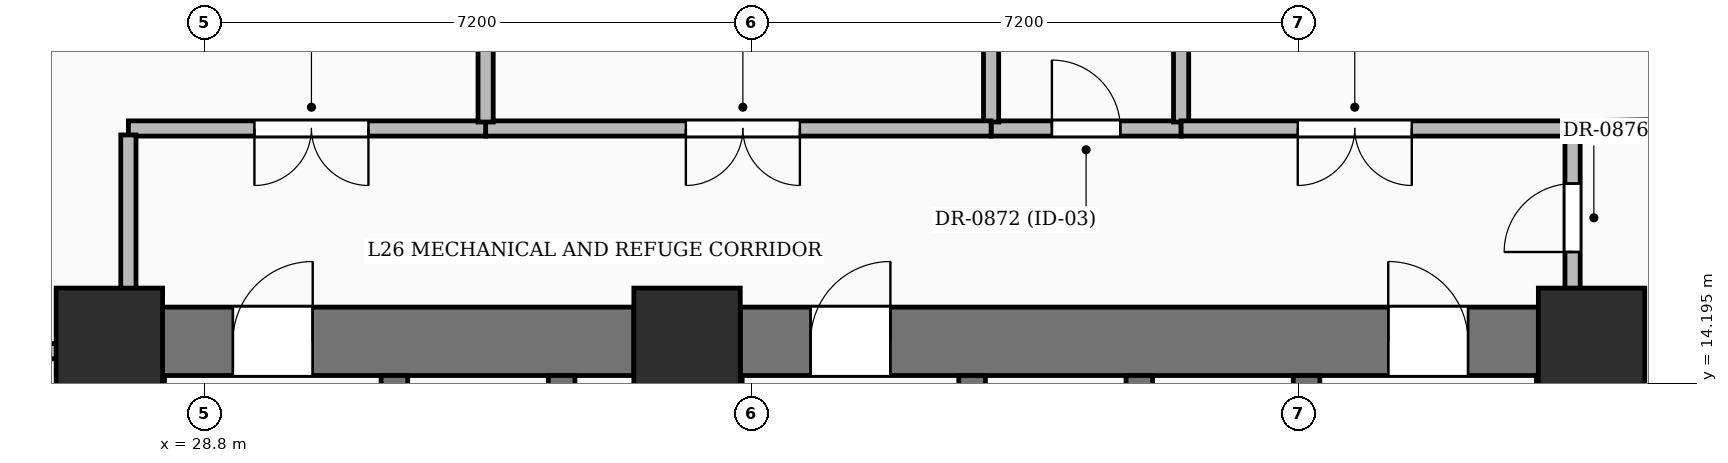
"""IFC4 building model, lengths in metres.
Left out: names, types, materials, properties, quantities, classifications, styles, units other than length and angle.
Written with IfcOpenShell. Run it as: python <this file> out.ifc"""

import sys

from ifc_helpers import new_model, si_unit, direction, frame, frame_2d, origin, origin_2d, place, context, subcontext, project, spatial, rectangle, extrude, element, fill, save


model = new_model("IFC4")
c1 = context("Model", 3, precision=1e-05, world=origin(), true_north=direction((0.0, 1.0)))
c2 = subcontext(c1, "Body", "Model", "MODEL_VIEW")
j1 = project(units=[si_unit("LENGTHUNIT", "METRE"), si_unit("PLANEANGLEUNIT", "RADIAN")], contexts=[c1])
p1 = place(None, origin())
s1 = spatial("IfcSite", under=j1, at=p1, CompositionType="ELEMENT")
p2 = place(p1, origin())
s2 = spatial("IfcBuilding", under=s1, at=p2, CompositionType="ELEMENT")
p3 = place(p2, frame((0.0, 0.0, 105.0)))
s3 = spatial("IfcBuildingStorey", under=s2, at=p3, CompositionType="ELEMENT", Elevation=105.0)
for number, where, z_axis, x_axis in (
    (1, (27.55, 14.75, 0.0), (0.0, 0.0, 1.0), (1.0, 0.0, 0.0)),
    (2, (35.15, 14.75, 0.0), (0.0, 0.0, 1.0), (1.0, 0.0, 0.0)),
    (3, (47.05, 14.75, 0.0), (0.0, 0.0, 1.0), (1.0, 0.0, 0.0)),
):
    element("IfcColumn", number, at=place(p3, frame(where, z_axis=z_axis, x_axis=x_axis)), inside=s3, PredefinedType="COLUMN", context=c2, shape_type="SweptSolid", body=[
        extrude(rectangle(XDim=1.4, YDim=1.4, at=origin_2d()), origin(), (0.0, 0.0, 1.0), 5.4),
    ])
p4 = place(p3, frame((28.25, 14.75, 0.0), z_axis=(0.0, 0.0, 1.0), x_axis=(1.0, 0.0, 0.0)))
e4 = element("IfcWall", 4, at=p4, inside=s3, PredefinedType="SHEAR", context=c2, shape_type="SweptSolid", body=[
    extrude(rectangle(XDim=6.2, YDim=0.9, at=frame_2d((3.1, 0.0))), origin(), (0.0, 0.0, 1.0), 5.4),
])
p5 = place(p4, frame((0.925, 0.0, 0.0)))
e5 = element("IfcOpeningElement", 5, at=p5, cuts=e4, PredefinedType="OPENING", context=c2, shape_type="SweptSolid", body=[
    extrude(rectangle(XDim=1.05, YDim=2.15, at=frame_2d((0.525, 1.075))), frame((0.0, 0.46, 0.0), z_axis=(0.0, -1.0, 0.0), x_axis=(1.0, 0.0, 0.0)), (0.0, 0.0, 1.0), 0.92),
])
p6 = place(p3, frame((35.85, 14.75, 0.0), z_axis=(0.0, 0.0, 1.0), x_axis=(1.0, 0.0, 0.0)))
e6 = element("IfcWall", 6, at=p6, inside=s3, PredefinedType="SHEAR", context=c2, shape_type="SweptSolid", body=[
    extrude(rectangle(XDim=10.5, YDim=0.9, at=frame_2d((5.25, 0.0))), origin(), (0.0, 0.0, 1.0), 5.4),
])
p7 = place(p6, frame((0.925, 0.0, 0.0)))
e7 = element("IfcOpeningElement", 7, at=p7, cuts=e6, PredefinedType="OPENING", context=c2, shape_type="SweptSolid", body=[
    extrude(rectangle(XDim=1.05, YDim=2.15, at=frame_2d((0.525, 1.075))), frame((0.0, 0.46, 0.0), z_axis=(0.0, -1.0, 0.0), x_axis=(1.0, 0.0, 0.0)), (0.0, 0.0, 1.0), 0.92),
])
p8 = place(p6, frame((8.525, 0.0, 0.0)))
e8 = element("IfcOpeningElement", 8, at=p8, cuts=e6, PredefinedType="OPENING", context=c2, shape_type="SweptSolid", body=[
    extrude(rectangle(XDim=1.05, YDim=2.15, at=frame_2d((0.525, 1.075))), frame((0.0, 0.46, 0.0), z_axis=(0.0, -1.0, 0.0), x_axis=(1.0, 0.0, 0.0)), (0.0, 0.0, 1.0), 0.92),
])
p9 = place(p3, frame((28.1, 5.2, 0.0), z_axis=(0.0, 0.0, 1.0), x_axis=(0.0, 1.0, 0.0)))
e9 = element("IfcWall", 9, at=p9, inside=s3, PredefinedType="SOLIDWALL", context=c2, shape_type="SweptSolid", body=[
    extrude(rectangle(XDim=9.1, YDim=0.35, at=frame_2d((4.55, 0.0))), origin(), (0.0, 0.0, 1.0), 5.4),
])
p10 = place(p3, frame((31.3, 5.2, 0.0), z_axis=(0.0, 0.0, 1.0), x_axis=(0.0, 1.0, 0.0)))
e10 = element("IfcWall", 10, at=p10, inside=s3, PredefinedType="SOLIDWALL", context=c2, shape_type="SweptSolid", body=[
    extrude(rectangle(XDim=9.1, YDim=0.35, at=frame_2d((4.55, 0.0))), origin(), (0.0, 0.0, 1.0), 5.4),
])
p11 = place(p10, frame((6.02, 0.0, 0.0)))
e11 = element("IfcOpeningElement", 11, at=p11, cuts=e10, PredefinedType="OPENING", context=c2, shape_type="SweptSolid", body=[
    extrude(rectangle(XDim=1.0, YDim=2.15, at=frame_2d((0.5, 1.075))), frame((0.0, 0.185, 0.0), z_axis=(0.0, -1.0, 0.0), x_axis=(1.0, 0.0, 0.0)), (0.0, 0.0, 1.0), 0.37),
])
p12 = place(p3, frame((35.7, 5.2, 0.0), z_axis=(0.0, 0.0, 1.0), x_axis=(0.0, 1.0, 0.0)))
e12 = element("IfcWall", 12, at=p12, inside=s3, PredefinedType="SOLIDWALL", context=c2, shape_type="SweptSolid", body=[
    extrude(rectangle(XDim=9.1, YDim=0.35, at=frame_2d((4.55, 0.0))), origin(), (0.0, 0.0, 1.0), 5.4),
])
p13 = place(p12, frame((6.02, 0.0, 0.0)))
e13 = element("IfcOpeningElement", 13, at=p13, cuts=e12, PredefinedType="OPENING", context=c2, shape_type="SweptSolid", body=[
    extrude(rectangle(XDim=1.0, YDim=2.15, at=frame_2d((0.5, 1.075))), frame((0.0, 0.185, 0.0), z_axis=(0.0, -1.0, 0.0), x_axis=(1.0, 0.0, 0.0)), (0.0, 0.0, 1.0), 0.37),
])
p14 = place(p3, frame((38.9, 5.2, 0.0), z_axis=(0.0, 0.0, 1.0), x_axis=(0.0, 1.0, 0.0)))
e14 = element("IfcWall", 14, at=p14, inside=s3, PredefinedType="SOLIDWALL", context=c2, shape_type="SweptSolid", body=[
    extrude(rectangle(XDim=9.1, YDim=0.35, at=frame_2d((4.55, 0.0))), origin(), (0.0, 0.0, 1.0), 5.4),
])
p15 = place(p14, frame((6.02, 0.0, 0.0)))
e15 = element("IfcOpeningElement", 15, at=p15, cuts=e14, PredefinedType="OPENING", context=c2, shape_type="SweptSolid", body=[
    extrude(rectangle(XDim=1.0, YDim=2.15, at=frame_2d((0.5, 1.075))), frame((0.0, 0.185, 0.0), z_axis=(0.0, -1.0, 0.0), x_axis=(1.0, 0.0, 0.0)), (0.0, 0.0, 1.0), 0.37),
])
p16 = place(p3, frame((43.3, 5.2, 0.0), z_axis=(0.0, 0.0, 1.0), x_axis=(0.0, 1.0, 0.0)))
e16 = element("IfcWall", 16, at=p16, inside=s3, PredefinedType="SOLIDWALL", context=c2, shape_type="SweptSolid", body=[
    extrude(rectangle(XDim=9.1, YDim=0.35, at=frame_2d((4.55, 0.0))), origin(), (0.0, 0.0, 1.0), 5.4),
])
p17 = place(p16, frame((6.02, 0.0, 0.0)))
e17 = element("IfcOpeningElement", 17, at=p17, cuts=e16, PredefinedType="OPENING", context=c2, shape_type="SweptSolid", body=[
    extrude(rectangle(XDim=1.0, YDim=2.15, at=frame_2d((0.5, 1.075))), frame((0.0, 0.185, 0.0), z_axis=(0.0, -1.0, 0.0), x_axis=(1.0, 0.0, 0.0)), (0.0, 0.0, 1.0), 0.37),
])
p18 = place(p3, frame((46.5, 5.2, 0.0), z_axis=(0.0, 0.0, 1.0), x_axis=(0.0, 1.0, 0.0)))
e18 = element("IfcWall", 18, at=p18, inside=s3, PredefinedType="SOLIDWALL", context=c2, shape_type="SweptSolid", body=[
    extrude(rectangle(XDim=9.1, YDim=0.35, at=frame_2d((4.55, 0.0))), origin(), (0.0, 0.0, 1.0), 5.4),
])
for number, where, z_axis, x_axis in (
    (19, (33.5, 12.375, 0.0), (0.0, 0.0, 1.0), (0.0, 1.0, 0.0)),
    (20, (41.1, 12.375, 0.0), (0.0, 0.0, 1.0), (0.0, 1.0, 0.0)),
):
    element("IfcWall", number, at=place(p3, frame(where, z_axis=z_axis, x_axis=x_axis)), inside=s3, PredefinedType="SOLIDWALL", context=c2, shape_type="SweptSolid", body=[
        extrude(rectangle(XDim=1.925, YDim=0.35, at=frame_2d((0.962, 0.0))), origin(), (0.0, 0.0, 1.0), 5.4),
    ])
p19 = place(p3, frame((25.955, 14.62, 0.0), z_axis=(0.0, 0.0, 1.0), x_axis=(1.0, 0.0, 0.0)))
e21 = element("IfcWall", 21, at=p19, inside=s3, PredefinedType="PARTITIONING", context=c2, shape_type="SweptSolid", body=[
    extrude(rectangle(XDim=1.13, YDim=0.2, at=frame_2d((0.565, 0.0))), origin(), (0.0, 0.0, 1.0), 5.15),
])
p20 = place(p3, frame((39.15, 17.55, 0.0), z_axis=(0.0, 0.0, 1.0), x_axis=(1.0, 0.0, 0.0)))
e22 = element("IfcWall", 22, at=p20, inside=s3, PredefinedType="PARTITIONING", context=c2, shape_type="SweptSolid", body=[
    extrude(rectangle(XDim=2.5, YDim=0.2, at=frame_2d((1.25, 0.0))), origin(), (0.0, 0.0, 1.0), 5.15),
])
p21 = place(p20, frame((0.8, 0.0, 0.0)))
e23 = element("IfcOpeningElement", 23, at=p21, cuts=e22, PredefinedType="OPENING", context=c2, shape_type="SweptSolid", body=[
    extrude(rectangle(XDim=0.9, YDim=2.1, at=frame_2d((0.45, 1.05))), frame((0.0, 0.11, 0.0), z_axis=(0.0, -1.0, 0.0), x_axis=(1.0, 0.0, 0.0)), (0.0, 0.0, 1.0), 0.22),
])
p22 = place(p3, frame((39.15, 26.5, 0.0), z_axis=(0.0, 0.0, 1.0), x_axis=(0.0, -1.0, 0.0)))
e24 = element("IfcWall", 24, at=p22, inside=s3, PredefinedType="PARTITIONING", context=c2, shape_type="SweptSolid", body=[
    extrude(rectangle(XDim=8.865, YDim=0.2, at=frame_2d((4.433, 0.0))), origin(), (0.0, 0.0, 1.0), 4.17),
])
p23 = place(p3, frame((41.65, 17.635, 0.0), z_axis=(0.0, 0.0, 1.0), x_axis=(0.0, 1.0, 0.0)))
e25 = element("IfcWall", 25, at=p23, inside=s3, PredefinedType="PARTITIONING", context=c2, shape_type="SweptSolid", body=[
    extrude(rectangle(XDim=11.665, YDim=0.2, at=frame_2d((5.833, 0.0))), origin(), (0.0, 0.0, 1.0), 4.17),
])
p24 = place(p3, frame((39.15, 17.55, 0.0), z_axis=(0.0, 0.0, 1.0), x_axis=(-1.0, 0.0, 0.0)))
e26 = element("IfcWall", 26, at=p24, inside=s3, PredefinedType="PARTITIONING", context=c2, shape_type="SweptSolid", body=[
    extrude(rectangle(XDim=6.65, YDim=0.2, at=frame_2d((3.325, 0.0))), origin(), (0.0, 0.0, 1.0), 4.236),
])
p25 = place(p24, frame((2.516, 0.0, 0.0)))
e27 = element("IfcOpeningElement", 27, at=p25, cuts=e26, PredefinedType="OPENING", context=c2, shape_type="SweptSolid", body=[
    extrude(rectangle(XDim=1.5, YDim=2.2, at=frame_2d((0.75, 1.1))), frame((0.0, 0.11, 0.0), z_axis=(0.0, -1.0, 0.0), x_axis=(1.0, 0.0, 0.0)), (0.0, 0.0, 1.0), 0.22),
])
p26 = place(p3, frame((46.8, 17.55, 0.0), z_axis=(0.0, 0.0, 1.0), x_axis=(-1.0, 0.0, 0.0)))
e28 = element("IfcWall", 28, at=p26, inside=s3, PredefinedType="PARTITIONING", context=c2, shape_type="SweptSolid", body=[
    extrude(rectangle(XDim=5.15, YDim=0.2, at=frame_2d((2.575, 0.0))), origin(), (0.0, 0.0, 1.0), 4.236),
])
p27 = place(p26, frame((2.115, 0.0, 0.0)))
e29 = element("IfcOpeningElement", 29, at=p27, cuts=e28, PredefinedType="OPENING", context=c2, shape_type="SweptSolid", body=[
    extrude(rectangle(XDim=1.5, YDim=2.2, at=frame_2d((0.75, 1.1))), frame((0.0, 0.11, 0.0), z_axis=(0.0, -1.0, 0.0), x_axis=(1.0, 0.0, 0.0)), (0.0, 0.0, 1.0), 0.22),
])
p28 = place(p3, frame((46.8, 15.2, 0.0), z_axis=(0.0, 0.0, 1.0), x_axis=(0.0, 1.0, 0.0)))
e30 = element("IfcWall", 30, at=p28, inside=s3, PredefinedType="PARTITIONING", context=c2, shape_type="SweptSolid", body=[
    extrude(rectangle(XDim=2.265, YDim=0.2, at=frame_2d((1.133, 0.0))), origin(), (0.0, 0.0, 1.0), 4.236),
])
p29 = place(p28, frame((0.725, 0.0, 0.0)))
e31 = element("IfcOpeningElement", 31, at=p29, cuts=e30, PredefinedType="OPENING", context=c2, shape_type="SweptSolid", body=[
    extrude(rectangle(XDim=0.9, YDim=2.1, at=frame_2d((0.45, 1.05))), frame((0.0, 0.11, 0.0), z_axis=(0.0, -1.0, 0.0), x_axis=(1.0, 0.0, 0.0)), (0.0, 0.0, 1.0), 0.22),
])
p30 = place(p3, frame((32.5, 17.55, 0.0), z_axis=(0.0, 0.0, 1.0), x_axis=(-1.0, 0.0, 0.0)))
e32 = element("IfcWall", 32, at=p30, inside=s3, PredefinedType="PARTITIONING", context=c2, shape_type="SweptSolid", body=[
    extrude(rectangle(XDim=4.7, YDim=0.2, at=frame_2d((2.35, 0.0))), origin(), (0.0, 0.0, 1.0), 5.15),
])
p31 = place(p30, frame((1.542, 0.0, 0.0)))
e33 = element("IfcOpeningElement", 33, at=p31, cuts=e32, PredefinedType="OPENING", context=c2, shape_type="SweptSolid", body=[
    extrude(rectangle(XDim=1.5, YDim=2.2, at=frame_2d((0.75, 1.1))), frame((0.0, 0.11, 0.0), z_axis=(0.0, -1.0, 0.0), x_axis=(1.0, 0.0, 0.0)), (0.0, 0.0, 1.0), 0.22),
])
p32 = place(p3, frame((27.8, 17.465, 0.0), z_axis=(0.0, 0.0, 1.0), x_axis=(0.0, -1.0, 0.0)))
e34 = element("IfcWall", 34, at=p32, inside=s3, PredefinedType="PARTITIONING", context=c2, shape_type="SweptSolid", body=[
    extrude(rectangle(XDim=2.265, YDim=0.2, at=frame_2d((1.133, 0.0))), origin(), (0.0, 0.0, 1.0), 5.15),
])
p33 = place(p3, frame((32.5, 26.415, 0.0), z_axis=(0.0, 0.0, 1.0), x_axis=(0.0, -1.0, 0.0)))
e35 = element("IfcWall", 35, at=p33, inside=s3, PredefinedType="PARTITIONING", context=c2, shape_type="SweptSolid", body=[
    extrude(rectangle(XDim=8.78, YDim=0.2, at=frame_2d((4.39, 0.0))), origin(), (0.0, 0.0, 1.0), 4.172),
])
p34 = place(p3, frame((46.8, 17.55, 0.0), z_axis=(0.0, 0.0, 1.0), x_axis=(0.999890796761, 0.014778178263, 0.0)))
e36 = element("IfcWall", 36, at=p34, inside=s3, PredefinedType="PARTITIONING", context=c2, shape_type="SweptSolid", body=[
    extrude(rectangle(XDim=6.559, YDim=0.2, at=frame_2d((3.279, 0.0))), origin(), (0.0, 0.0, 1.0), 4.172),
])
p35 = place(p5, origin())
e37 = element("IfcDoor", 37, at=p35, inside=s3, OperationType="SINGLE_SWING_RIGHT", PredefinedType="DOOR", context=c2, shape_type="SweptSolid", body=[
    extrude(rectangle(XDim=1.05, YDim=2.15, at=frame_2d((0.525, 1.075))), frame((0.0, 0.025, 0.0), z_axis=(0.0, -1.0, 0.0), x_axis=(1.0, 0.0, 0.0)), (0.0, 0.0, 1.0), 0.05),
])
fill(e5, e37)
p36 = place(p7, origin())
e38 = element("IfcDoor", 38, at=p36, inside=s3, OperationType="SINGLE_SWING_RIGHT", PredefinedType="DOOR", context=c2, shape_type="SweptSolid", body=[
    extrude(rectangle(XDim=1.05, YDim=2.15, at=frame_2d((0.525, 1.075))), frame((0.0, 0.025, 0.0), z_axis=(0.0, -1.0, 0.0), x_axis=(1.0, 0.0, 0.0)), (0.0, 0.0, 1.0), 0.05),
])
fill(e7, e38)
p37 = place(p8, origin())
e39 = element("IfcDoor", 39, at=p37, inside=s3, OperationType="SINGLE_SWING_LEFT", PredefinedType="DOOR", context=c2, shape_type="SweptSolid", body=[
    extrude(rectangle(XDim=1.05, YDim=2.15, at=frame_2d((0.525, 1.075))), frame((0.0, 0.025, 0.0), z_axis=(0.0, -1.0, 0.0), x_axis=(1.0, 0.0, 0.0)), (0.0, 0.0, 1.0), 0.05),
])
fill(e8, e39)
p38 = place(p21, origin())
e40 = element("IfcDoor", 40, at=p38, inside=s3, OperationType="SINGLE_SWING_LEFT", PredefinedType="DOOR", context=c2, shape_type="SweptSolid", body=[
    extrude(rectangle(XDim=0.9, YDim=2.1, at=frame_2d((0.45, 1.05))), frame((0.0, 0.025, 0.0), z_axis=(0.0, -1.0, 0.0), x_axis=(1.0, 0.0, 0.0)), (0.0, 0.0, 1.0), 0.05),
])
fill(e23, e40)
p39 = place(p25, origin())
e41 = element("IfcDoor", 41, at=p39, inside=s3, OperationType="DOUBLE_DOOR_SINGLE_SWING", PredefinedType="DOOR", context=c2, shape_type="SweptSolid", body=[
    extrude(rectangle(XDim=1.5, YDim=2.2, at=frame_2d((0.75, 1.1))), frame((0.0, 0.025, 0.0), z_axis=(0.0, -1.0, 0.0), x_axis=(1.0, 0.0, 0.0)), (0.0, 0.0, 1.0), 0.05),
])
fill(e27, e41)
p40 = place(p27, origin())
e42 = element("IfcDoor", 42, at=p40, inside=s3, OperationType="DOUBLE_DOOR_SINGLE_SWING", PredefinedType="DOOR", context=c2, shape_type="SweptSolid", body=[
    extrude(rectangle(XDim=1.5, YDim=2.2, at=frame_2d((0.75, 1.1))), frame((0.0, 0.025, 0.0), z_axis=(0.0, -1.0, 0.0), x_axis=(1.0, 0.0, 0.0)), (0.0, 0.0, 1.0), 0.05),
])
fill(e29, e42)
p41 = place(p31, origin())
e43 = element("IfcDoor", 43, at=p41, inside=s3, OperationType="DOUBLE_DOOR_SINGLE_SWING", PredefinedType="DOOR", context=c2, shape_type="SweptSolid", body=[
    extrude(rectangle(XDim=1.5, YDim=2.2, at=frame_2d((0.75, 1.1))), frame((0.0, 0.025, 0.0), z_axis=(0.0, -1.0, 0.0), x_axis=(1.0, 0.0, 0.0)), (0.0, 0.0, 1.0), 0.05),
])
fill(e33, e43)
p42 = place(p29, origin())
e44 = element("IfcDoor", 44, at=p42, inside=s3, OperationType="SINGLE_SWING_LEFT", PredefinedType="DOOR", context=c2, shape_type="SweptSolid", body=[
    extrude(rectangle(XDim=0.9, YDim=2.1, at=frame_2d((0.45, 1.05))), frame((0.0, 0.025, 0.0), z_axis=(0.0, -1.0, 0.0), x_axis=(1.0, 0.0, 0.0)), (0.0, 0.0, 1.0), 0.05),
])
fill(e31, e44)
save(model, sys.argv[1])
